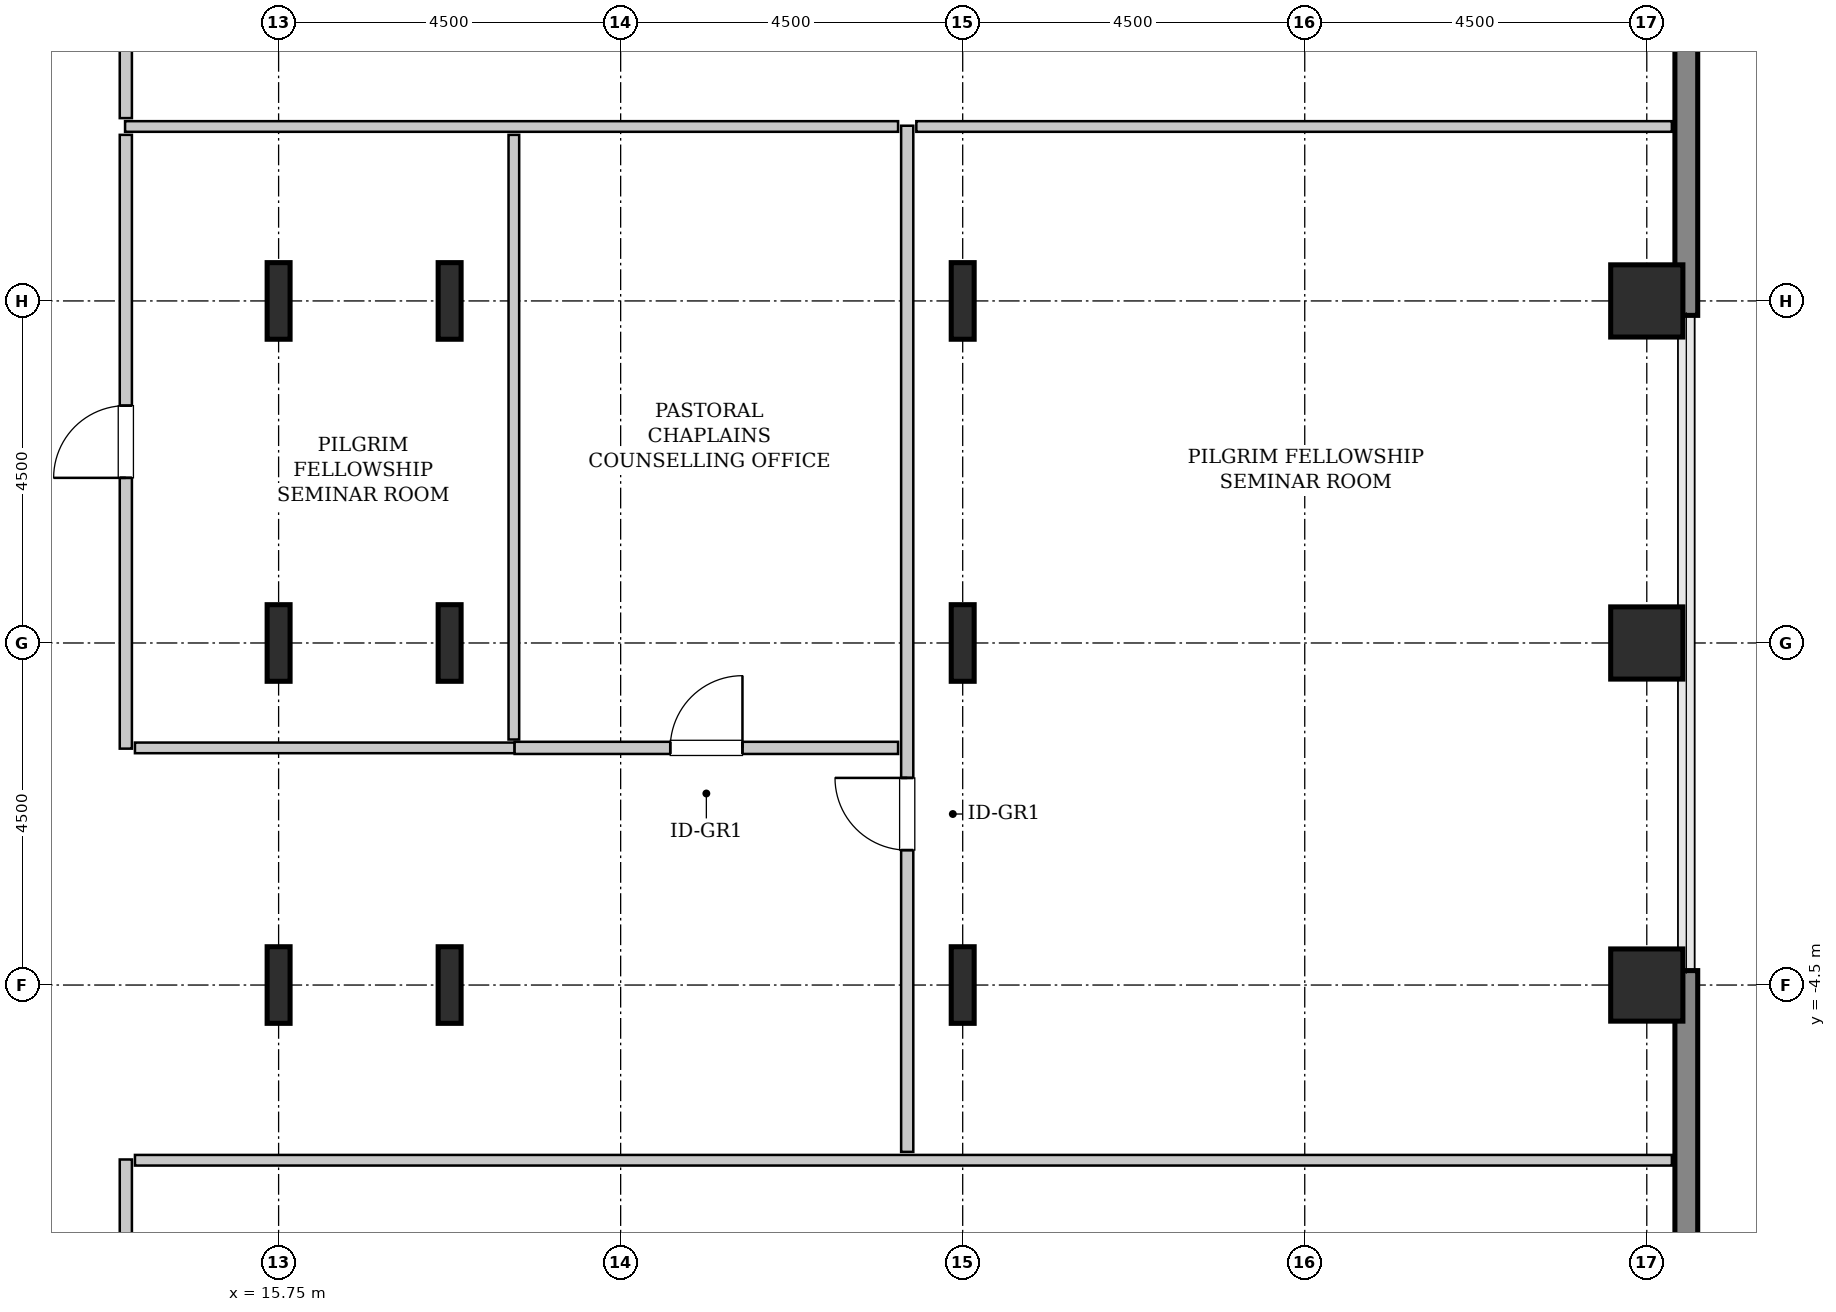
"""IFC4 building model, lengths in metres.
Left out: names, types, materials, properties, quantities, classifications, styles, units other than length and angle.
Written with IfcOpenShell. Run it as: python <this file> out.ifc"""

import sys

from ifc_helpers import new_model, si_unit, direction, frame, frame_2d, origin, origin_2d, place, context, subcontext, project, spatial, rectangle, hollow_rectangle, i_section, extrude, source, transform, mapped, element, fill, save


model = new_model("IFC4")
c1 = context("Model", 3, precision=1e-05, world=origin(), true_north=direction((0.0, 1.0)))
c2 = subcontext(c1, "Body", "Model", "MODEL_VIEW")
j1 = project(units=[si_unit("LENGTHUNIT", "METRE"), si_unit("PLANEANGLEUNIT", "RADIAN")], contexts=[c1])
p1 = place(None, origin())
s1 = spatial("IfcSite", under=j1, at=p1, CompositionType="ELEMENT")
p2 = place(p1, origin())
s2 = spatial("IfcBuilding", under=s1, at=p2, CompositionType="ELEMENT")
p3 = place(p2, frame((0.0, 0.0, 90.8)))
s3 = spatial("IfcBuildingStorey", under=s2, at=p3, CompositionType="ELEMENT", Elevation=90.8)
m1 = source(origin(), c2, "Body", "SweptSolid", [
    extrude(i_section(OverallWidth=0.302, OverallDepth=1.008, WebThickness=0.021, FlangeThickness=0.04, FilletRadius=0.03, at=origin_2d()), origin(), (0.0, 0.0, 1.0), 3.8),
])
for number, where, z_axis, x_axis in (
    (1, (15.75, -4.5, 0.0), (0.0, 0.0, 1.0), (1.0, 0.0, 0.0)),
    (2, (15.75, 0.0, 0.0), (0.0, 0.0, 1.0), (1.0, 0.0, 0.0)),
    (3, (15.75, 4.5, 0.0), (0.0, 0.0, 1.0), (1.0, 0.0, 0.0)),
    (4, (18.0, -4.5, 0.0), (0.0, 0.0, 1.0), (1.0, 0.0, 0.0)),
    (5, (18.0, 0.0, 0.0), (0.0, 0.0, 1.0), (1.0, 0.0, 0.0)),
    (6, (18.0, 4.5, 0.0), (0.0, 0.0, 1.0), (1.0, 0.0, 0.0)),
    (7, (24.75, -4.5, 0.0), (0.0, 0.0, 1.0), (1.0, 0.0, 0.0)),
    (8, (24.75, 0.0, 0.0), (0.0, 0.0, 1.0), (1.0, 0.0, 0.0)),
    (9, (24.75, 4.5, 0.0), (0.0, 0.0, 1.0), (1.0, 0.0, 0.0)),
):
    element("IfcColumn", number, at=place(p3, frame(where, z_axis=z_axis, x_axis=x_axis)), inside=s3, PredefinedType="COLUMN", context=c2, shape_type="MappedRepresentation", body=[
        mapped(m1, transform((0.0, 0.0, 0.0), x_axis=(1.0, 0.0, 0.0), y_axis=(0.0, 1.0, 0.0), z_axis=(0.0, 0.0, 1.0), scale=1.0)),
    ])
m2 = source(origin(), c2, "Body", "SweptSolid", [
    extrude(hollow_rectangle(XDim=0.95, YDim=0.95, WallThickness=0.045, InnerFilletRadius=0.045, OuterFilletRadius=0.09, at=origin_2d()), origin(), (0.0, 0.0, 1.0), 3.8),
])
for number, where, z_axis, x_axis in (
    (10, (33.75, -4.5, 0.0), (0.0, 0.0, 1.0), (1.0, 0.0, 0.0)),
    (11, (33.75, 0.0, 0.0), (0.0, 0.0, 1.0), (1.0, 0.0, 0.0)),
    (12, (33.75, 4.5, 0.0), (0.0, 0.0, 1.0), (1.0, 0.0, 0.0)),
):
    element("IfcColumn", number, at=place(p3, frame(where, z_axis=z_axis, x_axis=x_axis)), inside=s3, PredefinedType="COLUMN", context=c2, shape_type="MappedRepresentation", body=[
        mapped(m2, transform((0.0, 0.0, 0.0), x_axis=(1.0, 0.0, 0.0), y_axis=(0.0, 1.0, 0.0), z_axis=(0.0, 0.0, 1.0), scale=1.0)),
    ])
m3 = source(origin(), c2, "Body", "SweptSolid", [
    extrude(rectangle(XDim=4.88, YDim=0.3, at=frame_2d((2.44, 0.0))), origin(), (0.0, 0.0, 1.0), 3.55),
])
for number, where, z_axis, x_axis in (
    (13, (34.27, -9.19, 0.0), (0.0, 0.0, 1.0), (0.0, 1.0, 0.0)),
    (14, (34.27, 4.31, 0.0), (0.0, 0.0, 1.0), (0.0, 1.0, 0.0)),
):
    element("IfcWall", number, at=place(p3, frame(where, z_axis=z_axis, x_axis=x_axis)), inside=s3, PredefinedType="SHEAR", context=c2, shape_type="MappedRepresentation", body=[
        mapped(m3, transform((0.0, 0.0, 0.0), x_axis=(1.0, 0.0, 0.0), y_axis=(0.0, 1.0, 0.0), z_axis=(0.0, 0.0, 1.0), scale=1.0)),
    ])
m4 = source(origin(), c2, "Body", "SweptSolid", [
    extrude(rectangle(XDim=16.245, YDim=0.16, at=frame_2d((8.123, 0.0))), origin(), (0.0, 0.0, 1.0), 3.535),
])
p4 = place(p3, frame((13.74, -23.04, 0.0), z_axis=(0.0, 0.0, 1.0), x_axis=(0.0, 1.0, 0.0)))
e15 = element("IfcWall", 15, at=p4, inside=s3, PredefinedType="PARTITIONING", context=c2, shape_type="MappedRepresentation", body=[
    mapped(m4, transform((0.0, 0.0, 0.0), x_axis=(1.0, 0.0, 0.0), y_axis=(0.0, 1.0, 0.0), z_axis=(0.0, 0.0, 1.0), scale=1.0)),
])
p5 = place(p4, frame((13.413, 0.0, 0.0)))
e16 = element("IfcOpeningElement", 16, at=p5, cuts=e15, PredefinedType="OPENING", context=c2, shape_type="SweptSolid", body=[
    extrude(rectangle(XDim=0.95, YDim=2.1, at=frame_2d((0.475, 1.05))), frame((0.0, 0.09, 0.0), z_axis=(0.0, -1.0, 0.0), x_axis=(1.0, 0.0, 0.0)), (0.0, 0.0, 1.0), 0.18),
])
m5 = source(origin(), c2, "Body", "SweptSolid", [
    extrude(rectangle(XDim=20.22, YDim=0.14, at=frame_2d((10.11, 0.0))), origin(), (0.0, 0.0, 1.0), 3.535),
])
p6 = place(p3, frame((13.86, -6.805, 0.0), z_axis=(0.0, 0.0, 1.0), x_axis=(1.0, 0.0, 0.0)))
e17 = element("IfcWall", 17, at=p6, inside=s3, PredefinedType="PARTITIONING", context=c2, shape_type="MappedRepresentation", body=[
    mapped(m5, transform((0.0, 0.0, 0.0), x_axis=(1.0, 0.0, 0.0), y_axis=(0.0, 1.0, 0.0), z_axis=(0.0, 0.0, 1.0), scale=1.0)),
])
m6 = source(origin(), c2, "Body", "SweptSolid", [
    extrude(rectangle(XDim=13.5, YDim=0.16, at=frame_2d((6.75, 0.0))), origin(), (0.0, 0.0, 1.0), 3.535),
])
p7 = place(p3, frame((24.02, -6.695, 0.0), z_axis=(0.0, 0.0, 1.0), x_axis=(0.0, 1.0, 0.0)))
e18 = element("IfcWall", 18, at=p7, inside=s3, PredefinedType="PARTITIONING", context=c2, shape_type="MappedRepresentation", body=[
    mapped(m6, transform((0.0, 0.0, 0.0), x_axis=(1.0, 0.0, 0.0), y_axis=(0.0, 1.0, 0.0), z_axis=(0.0, 0.0, 1.0), scale=1.0)),
])
p8 = place(p7, frame((3.97, 0.0, 0.0)))
e19 = element("IfcOpeningElement", 19, at=p8, cuts=e18, PredefinedType="OPENING", context=c2, shape_type="SweptSolid", body=[
    extrude(rectangle(XDim=0.95, YDim=2.1, at=frame_2d((0.475, 1.05))), frame((0.0, 0.09, 0.0), z_axis=(0.0, -1.0, 0.0), x_axis=(1.0, 0.0, 0.0)), (0.0, 0.0, 1.0), 0.18),
])
m7 = source(origin(), c2, "Body", "SweptSolid", [
    extrude(rectangle(XDim=10.17, YDim=0.14, at=frame_2d((5.085, 0.0))), origin(), (0.0, 0.0, 1.0), 3.535),
])
p9 = place(p3, frame((13.73, 6.795, 0.0), z_axis=(0.0, 0.0, 1.0), x_axis=(1.0, 0.0, 0.0)))
e20 = element("IfcWall", 20, at=p9, inside=s3, PredefinedType="PARTITIONING", context=c2, shape_type="MappedRepresentation", body=[
    mapped(m7, transform((0.0, 0.0, 0.0), x_axis=(1.0, 0.0, 0.0), y_axis=(0.0, 1.0, 0.0), z_axis=(0.0, 0.0, 1.0), scale=1.0)),
])
m8 = source(origin(), c2, "Body", "SweptSolid", [
    extrude(rectangle(XDim=9.94, YDim=0.14, at=frame_2d((4.97, 0.0))), origin(), (0.0, 0.0, 1.0), 3.535),
])
p10 = place(p3, frame((24.14, 6.795, 0.0), z_axis=(0.0, 0.0, 1.0), x_axis=(1.0, 0.0, 0.0)))
e21 = element("IfcWall", 21, at=p10, inside=s3, PredefinedType="PARTITIONING", context=c2, shape_type="MappedRepresentation", body=[
    mapped(m8, transform((0.0, 0.0, 0.0), x_axis=(1.0, 0.0, 0.0), y_axis=(0.0, 1.0, 0.0), z_axis=(0.0, 0.0, 1.0), scale=1.0)),
])
m9 = source(origin(), c2, "Body", "SweptSolid", [
    extrude(rectangle(XDim=8.075, YDim=0.16, at=frame_2d((4.038, 0.0))), origin(), (0.0, 0.0, 1.0), 3.535),
])
p11 = place(p3, frame((13.74, -1.39, 0.0), z_axis=(0.0, 0.0, 1.0), x_axis=(0.0, 1.0, 0.0)))
e22 = element("IfcWall", 22, at=p11, inside=s3, PredefinedType="PARTITIONING", context=c2, shape_type="MappedRepresentation", body=[
    mapped(m9, transform((0.0, 0.0, 0.0), x_axis=(1.0, 0.0, 0.0), y_axis=(0.0, 1.0, 0.0), z_axis=(0.0, 0.0, 1.0), scale=1.0)),
])
p12 = place(p11, frame((3.562, 0.0, 0.0)))
e23 = element("IfcOpeningElement", 23, at=p12, cuts=e22, PredefinedType="OPENING", context=c2, shape_type="SweptSolid", body=[
    extrude(rectangle(XDim=0.95, YDim=2.1, at=frame_2d((0.475, 1.05))), frame((0.0, 0.09, 0.0), z_axis=(0.0, -1.0, 0.0), x_axis=(1.0, 0.0, 0.0)), (0.0, 0.0, 1.0), 0.18),
])
m10 = source(origin(), c2, "Body", "SweptSolid", [
    extrude(rectangle(XDim=4.995, YDim=0.14, at=frame_2d((2.498, 0.0))), origin(), (0.0, 0.0, 1.0), 3.535),
])
p13 = place(p3, frame((13.86, -1.38, 0.0), z_axis=(0.0, 0.0, 1.0), x_axis=(1.0, 0.0, 0.0)))
e24 = element("IfcWall", 24, at=p13, inside=s3, PredefinedType="PARTITIONING", context=c2, shape_type="MappedRepresentation", body=[
    mapped(m10, transform((0.0, 0.0, 0.0), x_axis=(1.0, 0.0, 0.0), y_axis=(0.0, 1.0, 0.0), z_axis=(0.0, 0.0, 1.0), scale=1.0)),
])
m11 = source(origin(), c2, "Body", "SweptSolid", [
    extrude(rectangle(XDim=7.955, YDim=0.14, at=frame_2d((3.978, 0.0))), origin(), (0.0, 0.0, 1.0), 3.535),
])
p14 = place(p3, frame((18.845, -1.27, 0.0), z_axis=(0.0, 0.0, 1.0), x_axis=(0.0, 1.0, 0.0)))
e25 = element("IfcWall", 25, at=p14, inside=s3, PredefinedType="PARTITIONING", context=c2, shape_type="MappedRepresentation", body=[
    mapped(m11, transform((0.0, 0.0, 0.0), x_axis=(1.0, 0.0, 0.0), y_axis=(0.0, 1.0, 0.0), z_axis=(0.0, 0.0, 1.0), scale=1.0)),
])
m12 = source(origin(), c2, "Body", "SweptSolid", [
    extrude(rectangle(XDim=5.045, YDim=0.16, at=frame_2d((2.522, 0.0))), origin(), (0.0, 0.0, 1.0), 3.535),
])
p15 = place(p3, frame((18.855, -1.38, 0.0), z_axis=(0.0, 0.0, 1.0), x_axis=(1.0, 0.0, 0.0)))
e26 = element("IfcWall", 26, at=p15, inside=s3, PredefinedType="PARTITIONING", context=c2, shape_type="MappedRepresentation", body=[
    mapped(m12, transform((0.0, 0.0, 0.0), x_axis=(1.0, 0.0, 0.0), y_axis=(0.0, 1.0, 0.0), z_axis=(0.0, 0.0, 1.0), scale=1.0)),
])
p16 = place(p15, frame((2.048, 0.0, 0.0)))
e27 = element("IfcOpeningElement", 27, at=p16, cuts=e26, PredefinedType="OPENING", context=c2, shape_type="SweptSolid", body=[
    extrude(rectangle(XDim=0.95, YDim=2.1, at=frame_2d((0.475, 1.05))), frame((0.0, 0.09, 0.0), z_axis=(0.0, -1.0, 0.0), x_axis=(1.0, 0.0, 0.0)), (0.0, 0.0, 1.0), 0.18),
])
m13 = source(origin(), c2, "Body", "SweptSolid", [
    extrude(rectangle(XDim=16.135, YDim=0.16, at=frame_2d((8.067, 0.0))), origin(), (0.0, 0.0, 1.0), 3.535),
])
p17 = place(p3, frame((13.74, 6.905, 0.0), z_axis=(0.0, 0.0, 1.0), x_axis=(0.0, 1.0, 0.0)))
e28 = element("IfcWall", 28, at=p17, inside=s3, PredefinedType="PARTITIONING", context=c2, shape_type="MappedRepresentation", body=[
    mapped(m13, transform((0.0, 0.0, 0.0), x_axis=(1.0, 0.0, 0.0), y_axis=(0.0, 1.0, 0.0), z_axis=(0.0, 0.0, 1.0), scale=1.0)),
])
p18 = place(p17, frame((1.827, 0.0, 0.0)))
e29 = element("IfcOpeningElement", 29, at=p18, cuts=e28, PredefinedType="OPENING", context=c2, shape_type="SweptSolid", body=[
    extrude(rectangle(XDim=0.95, YDim=2.1, at=frame_2d((0.475, 1.05))), frame((0.0, 0.09, 0.0), z_axis=(0.0, -1.0, 0.0), x_axis=(1.0, 0.0, 0.0)), (0.0, 0.0, 1.0), 0.18),
])
m14 = source(origin(), c2, "Body", "SweptSolid", [
    extrude(rectangle(XDim=0.95, YDim=2.1, at=frame_2d((0.475, 1.05))), frame((0.0, 0.025, 0.0), z_axis=(0.0, -1.0, 0.0), x_axis=(1.0, 0.0, 0.0)), (0.0, 0.0, 1.0), 0.05),
])
p19 = place(p8, origin())
e30 = element("IfcDoor", 30, at=p19, inside=s3, OperationType="SINGLE_SWING_RIGHT", PredefinedType="DOOR", context=c2, shape_type="MappedRepresentation", body=[
    mapped(m14, transform((0.0, 0.0, 0.0), x_axis=(1.0, 0.0, 0.0), y_axis=(0.0, 1.0, 0.0), z_axis=(0.0, 0.0, 1.0), scale=1.0)),
])
fill(e19, e30)
p20 = place(p12, origin())
e31 = element("IfcDoor", 31, at=p20, inside=s3, OperationType="SINGLE_SWING_LEFT", PredefinedType="DOOR", context=c2, shape_type="MappedRepresentation", body=[
    mapped(m14, transform((0.0, 0.0, 0.0), x_axis=(1.0, 0.0, 0.0), y_axis=(0.0, 1.0, 0.0), z_axis=(0.0, 0.0, 1.0), scale=1.0)),
])
fill(e23, e31)
p21 = place(p16, origin())
e32 = element("IfcDoor", 32, at=p21, inside=s3, OperationType="SINGLE_SWING_RIGHT", PredefinedType="DOOR", context=c2, shape_type="MappedRepresentation", body=[
    mapped(m14, transform((0.0, 0.0, 0.0), x_axis=(1.0, 0.0, 0.0), y_axis=(0.0, 1.0, 0.0), z_axis=(0.0, 0.0, 1.0), scale=1.0)),
])
fill(e27, e32)
save(model, sys.argv[1])
